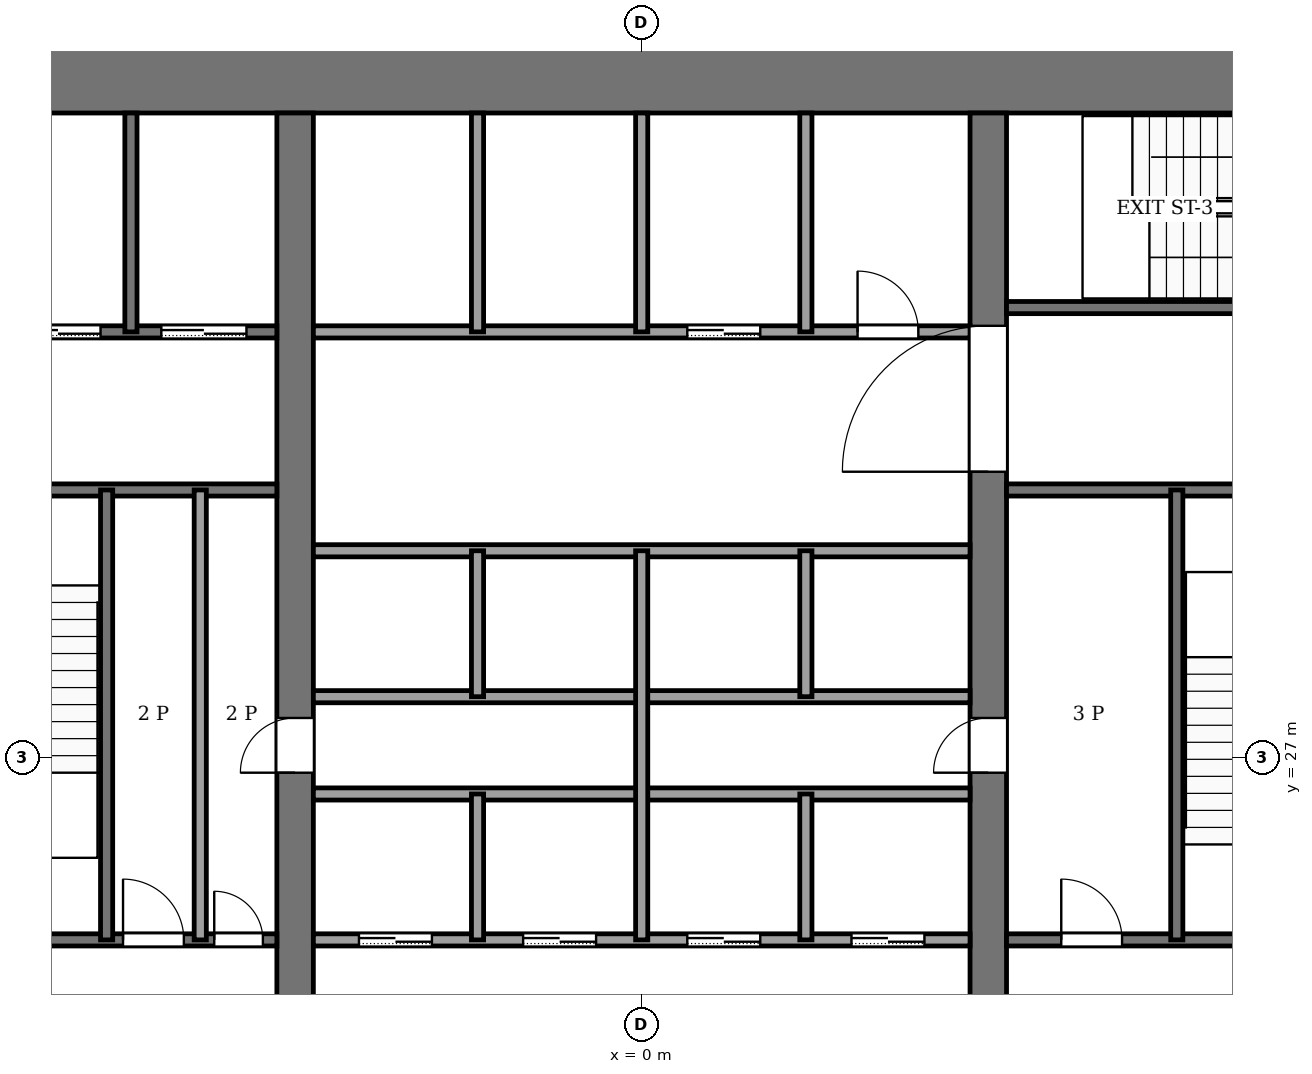
"""IFC4 building model, lengths in metres.
Left out: names, types, materials, properties, quantities, classifications, styles, units other than length and angle.
Written with IfcOpenShell. Run it as: python <this file> out.ifc"""

import sys

from ifc_helpers import new_model, si_unit, direction, frame, frame_2d, origin, place, context, subcontext, project, spatial, rectangle, extrude, element, fill, save


model = new_model("IFC4")
c1 = context("Model", 3, precision=1e-05, world=origin(), true_north=direction((0.0, 1.0)))
c2 = subcontext(c1, "Body", "Model", "MODEL_VIEW")
j1 = project(units=[si_unit("LENGTHUNIT", "METRE"), si_unit("PLANEANGLEUNIT", "RADIAN")], contexts=[c1])
p1 = place(None, origin())
s1 = spatial("IfcSite", under=j1, at=p1, CompositionType="ELEMENT")
p2 = place(p1, origin())
s2 = spatial("IfcBuilding", under=s1, at=p2, CompositionType="ELEMENT")
p3 = place(p2, frame((0.0, 0.0, 34.0)))
s3 = spatial("IfcBuildingStorey", under=s2, at=p3, CompositionType="ELEMENT", Elevation=34.0)
p4 = place(p3, frame((-14.0, 38.3, -0.13), z_axis=(0.0, 0.0, 1.0), x_axis=(1.0, 0.0, 0.0)))
e1 = element("IfcWall", 1, at=p4, inside=s3, PredefinedType="SHEAR", context=c2, shape_type="SweptSolid", body=[
    extrude(rectangle(XDim=28.0, YDim=1.4, at=frame_2d((14.0, 0.0))), origin(), (0.0, 0.0, 1.0), 4.0),
])
p5 = place(p3, frame((-5.7, 18.4, -0.13), z_axis=(0.0, 0.0, 1.0), x_axis=(0.0, 1.0, 0.0)))
e2 = element("IfcWall", 2, at=p5, inside=s3, PredefinedType="SHEAR", context=c2, shape_type="SweptSolid", body=[
    extrude(rectangle(XDim=19.2, YDim=0.6, at=frame_2d((9.6, 0.0))), origin(), (0.0, 0.0, 1.0), 4.0),
])
p6 = place(p5, frame((8.35, 0.0, 0.13)))
e3 = element("IfcOpeningElement", 3, at=p6, cuts=e2, PredefinedType="OPENING", context=c2, shape_type="SweptSolid", body=[
    extrude(rectangle(XDim=0.9, YDim=2.1, at=frame_2d((0.45, 1.05))), frame((0.0, 0.31, 0.0), z_axis=(0.0, -1.0, 0.0), x_axis=(1.0, 0.0, 0.0)), (0.0, 0.0, 1.0), 0.62),
])
p7 = place(p3, frame((5.7, 18.4, -0.13), z_axis=(0.0, 0.0, 1.0), x_axis=(0.0, 1.0, 0.0)))
e4 = element("IfcWall", 4, at=p7, inside=s3, PredefinedType="SHEAR", context=c2, shape_type="SweptSolid", body=[
    extrude(rectangle(XDim=19.2, YDim=0.6, at=frame_2d((9.6, 0.0))), origin(), (0.0, 0.0, 1.0), 4.0),
])
p8 = place(p7, frame((8.35, 0.0, 0.13)))
e5 = element("IfcOpeningElement", 5, at=p8, cuts=e4, PredefinedType="OPENING", context=c2, shape_type="SweptSolid", body=[
    extrude(rectangle(XDim=0.9, YDim=2.1, at=frame_2d((0.45, 1.05))), frame((0.0, 0.31, 0.0), z_axis=(0.0, -1.0, 0.0), x_axis=(1.0, 0.0, 0.0)), (0.0, 0.0, 1.0), 0.62),
])
p9 = place(p7, frame((13.3, 0.0, 0.13)))
e6 = element("IfcOpeningElement", 6, at=p9, cuts=e4, PredefinedType="OPENING", context=c2, shape_type="SweptSolid", body=[
    extrude(rectangle(XDim=2.4, YDim=2.4, at=frame_2d((1.2, 1.2))), frame((0.0, 0.31, 0.0), z_axis=(0.0, -1.0, 0.0), x_axis=(1.0, 0.0, 0.0)), (0.0, 0.0, 1.0), 0.62),
])
p10 = place(p3, frame((-12.6, 24.0, 0.0), z_axis=(0.0, 0.0, 1.0), x_axis=(1.0, 0.0, 0.0)))
e7 = element("IfcWall", 7, at=p10, inside=s3, PredefinedType="PARTITIONING", context=c2, shape_type="SweptSolid", body=[
    extrude(rectangle(XDim=6.6, YDim=0.2, at=frame_2d((3.3, 0.0))), origin(), (0.0, 0.0, 1.0), 3.87),
])
p11 = place(p10, frame((4.07, 0.0, 0.0)))
e8 = element("IfcOpeningElement", 8, at=p11, cuts=e7, PredefinedType="OPENING", context=c2, shape_type="SweptSolid", body=[
    extrude(rectangle(XDim=1.0, YDim=2.1, at=frame_2d((0.5, 1.05))), frame((0.0, 0.11, 0.0), z_axis=(0.0, -1.0, 0.0), x_axis=(1.0, 0.0, 0.0)), (0.0, 0.0, 1.0), 0.22),
])
p12 = place(p10, frame((5.57, 0.0, 0.0)))
e9 = element("IfcOpeningElement", 9, at=p12, cuts=e7, PredefinedType="OPENING", context=c2, shape_type="SweptSolid", body=[
    extrude(rectangle(XDim=0.8, YDim=2.1, at=frame_2d((0.4, 1.05))), frame((0.0, 0.11, 0.0), z_axis=(0.0, -1.0, 0.0), x_axis=(1.0, 0.0, 0.0)), (0.0, 0.0, 1.0), 0.22),
])
p13 = place(p3, frame((-5.4, 24.0, 0.0), z_axis=(0.0, 0.0, 1.0), x_axis=(1.0, 0.0, 0.0)))
e10 = element("IfcWall", 10, at=p13, inside=s3, PredefinedType="PARTITIONING", context=c2, shape_type="SweptSolid", body=[
    extrude(rectangle(XDim=10.8, YDim=0.2, at=frame_2d((5.4, 0.0))), origin(), (0.0, 0.0, 1.0), 3.87),
])
p14 = place(p13, frame((0.75, 0.0, 0.0)))
e11 = element("IfcOpeningElement", 11, at=p14, cuts=e10, PredefinedType="OPENING", context=c2, shape_type="SweptSolid", body=[
    extrude(rectangle(XDim=1.2, YDim=2.2, at=frame_2d((0.6, 1.1))), frame((0.0, 0.11, 0.0), z_axis=(0.0, -1.0, 0.0), x_axis=(1.0, 0.0, 0.0)), (0.0, 0.0, 1.0), 0.22),
])
p15 = place(p13, frame((3.45, 0.0, 0.0)))
e12 = element("IfcOpeningElement", 12, at=p15, cuts=e10, PredefinedType="OPENING", context=c2, shape_type="SweptSolid", body=[
    extrude(rectangle(XDim=1.2, YDim=2.2, at=frame_2d((0.6, 1.1))), frame((0.0, 0.11, 0.0), z_axis=(0.0, -1.0, 0.0), x_axis=(1.0, 0.0, 0.0)), (0.0, 0.0, 1.0), 0.22),
])
p16 = place(p13, frame((6.15, 0.0, 0.0)))
e13 = element("IfcOpeningElement", 13, at=p16, cuts=e10, PredefinedType="OPENING", context=c2, shape_type="SweptSolid", body=[
    extrude(rectangle(XDim=1.2, YDim=2.2, at=frame_2d((0.6, 1.1))), frame((0.0, 0.11, 0.0), z_axis=(0.0, -1.0, 0.0), x_axis=(1.0, 0.0, 0.0)), (0.0, 0.0, 1.0), 0.22),
])
p17 = place(p13, frame((8.85, 0.0, 0.0)))
e14 = element("IfcOpeningElement", 14, at=p17, cuts=e10, PredefinedType="OPENING", context=c2, shape_type="SweptSolid", body=[
    extrude(rectangle(XDim=1.2, YDim=2.2, at=frame_2d((0.6, 1.1))), frame((0.0, 0.11, 0.0), z_axis=(0.0, -1.0, 0.0), x_axis=(1.0, 0.0, 0.0)), (0.0, 0.0, 1.0), 0.22),
])
p18 = place(p3, frame((6.0, 24.0, 0.0), z_axis=(0.0, 0.0, 1.0), x_axis=(1.0, 0.0, 0.0)))
e15 = element("IfcWall", 15, at=p18, inside=s3, PredefinedType="PARTITIONING", context=c2, shape_type="SweptSolid", body=[
    extrude(rectangle(XDim=6.6, YDim=0.2, at=frame_2d((3.3, 0.0))), origin(), (0.0, 0.0, 1.0), 3.87),
])
p19 = place(p18, frame((0.9, 0.0, 0.0)))
e16 = element("IfcOpeningElement", 16, at=p19, cuts=e15, PredefinedType="OPENING", context=c2, shape_type="SweptSolid", body=[
    extrude(rectangle(XDim=1.0, YDim=2.1, at=frame_2d((0.5, 1.05))), frame((0.0, 0.11, 0.0), z_axis=(0.0, -1.0, 0.0), x_axis=(1.0, 0.0, 0.0)), (0.0, 0.0, 1.0), 0.22),
])
p20 = place(p18, frame((4.4, 0.0, 0.0)))
e17 = element("IfcOpeningElement", 17, at=p20, cuts=e15, PredefinedType="OPENING", context=c2, shape_type="SweptSolid", body=[
    extrude(rectangle(XDim=1.2, YDim=2.2, at=frame_2d((0.6, 1.1))), frame((0.0, 0.11, 0.0), z_axis=(0.0, -1.0, 0.0), x_axis=(1.0, 0.0, 0.0)), (0.0, 0.0, 1.0), 0.22),
])
for number, where, z_axis, x_axis in (
    (18, (-5.4, 26.4, 0.0), (0.0, 0.0, 1.0), (1.0, 0.0, 0.0)),
    (19, (-5.4, 28.0, 0.0), (0.0, 0.0, 1.0), (1.0, 0.0, 0.0)),
    (20, (-5.4, 30.4, 0.0), (0.0, 0.0, 1.0), (1.0, 0.0, 0.0)),
):
    element("IfcWall", number, at=place(p3, frame(where, z_axis=z_axis, x_axis=x_axis)), inside=s3, PredefinedType="PARTITIONING", context=c2, shape_type="SweptSolid", body=[
        extrude(rectangle(XDim=10.8, YDim=0.2, at=frame_2d((5.4, 0.0))), origin(), (0.0, 0.0, 1.0), 3.87),
    ])
p21 = place(p3, frame((-12.6, 31.4, 0.0), z_axis=(0.0, 0.0, 1.0), x_axis=(1.0, 0.0, 0.0)))
e21 = element("IfcWall", 21, at=p21, inside=s3, PredefinedType="PARTITIONING", context=c2, shape_type="SweptSolid", body=[
    extrude(rectangle(XDim=6.6, YDim=0.2, at=frame_2d((3.3, 0.0))), origin(), (0.0, 0.0, 1.0), 3.87),
])
p22 = place(p21, frame((1.0, 0.0, 0.0)))
e22 = element("IfcOpeningElement", 22, at=p22, cuts=e21, PredefinedType="OPENING", context=c2, shape_type="SweptSolid", body=[
    extrude(rectangle(XDim=1.2, YDim=2.2, at=frame_2d((0.6, 1.1))), frame((0.0, 0.11, 0.0), z_axis=(0.0, -1.0, 0.0), x_axis=(1.0, 0.0, 0.0)), (0.0, 0.0, 1.0), 0.22),
])
p23 = place(p3, frame((6.0, 31.4, 0.0), z_axis=(0.0, 0.0, 1.0), x_axis=(1.0, 0.0, 0.0)))
e23 = element("IfcWall", 23, at=p23, inside=s3, PredefinedType="PARTITIONING", context=c2, shape_type="SweptSolid", body=[
    extrude(rectangle(XDim=6.6, YDim=0.2, at=frame_2d((3.3, 0.0))), origin(), (0.0, 0.0, 1.0), 3.87),
])
p24 = place(p3, frame((-12.6, 34.0, 0.0), z_axis=(0.0, 0.0, 1.0), x_axis=(1.0, 0.0, 0.0)))
e24 = element("IfcWall", 24, at=p24, inside=s3, PredefinedType="PARTITIONING", context=c2, shape_type="SweptSolid", body=[
    extrude(rectangle(XDim=6.6, YDim=0.2, at=frame_2d((3.3, 0.0))), origin(), (0.0, 0.0, 1.0), 3.87),
])
p25 = place(p24, frame((4.7, 0.0, 0.0)))
e25 = element("IfcOpeningElement", 25, at=p25, cuts=e24, PredefinedType="OPENING", context=c2, shape_type="SweptSolid", body=[
    extrude(rectangle(XDim=1.4, YDim=2.2, at=frame_2d((0.7, 1.1))), frame((0.0, 0.11, 0.0), z_axis=(0.0, -1.0, 0.0), x_axis=(1.0, 0.0, 0.0)), (0.0, 0.0, 1.0), 0.22),
])
p26 = place(p24, frame((2.3, 0.0, 0.0)))
e26 = element("IfcOpeningElement", 26, at=p26, cuts=e24, PredefinedType="OPENING", context=c2, shape_type="SweptSolid", body=[
    extrude(rectangle(XDim=1.4, YDim=2.2, at=frame_2d((0.7, 1.1))), frame((0.0, 0.11, 0.0), z_axis=(0.0, -1.0, 0.0), x_axis=(1.0, 0.0, 0.0)), (0.0, 0.0, 1.0), 0.22),
])
p27 = place(p24, frame((0.45, 0.0, 0.0)))
e27 = element("IfcOpeningElement", 27, at=p27, cuts=e24, PredefinedType="OPENING", context=c2, shape_type="SweptSolid", body=[
    extrude(rectangle(XDim=0.9, YDim=2.1, at=frame_2d((0.45, 1.05))), frame((0.0, 0.11, 0.0), z_axis=(0.0, -1.0, 0.0), x_axis=(1.0, 0.0, 0.0)), (0.0, 0.0, 1.0), 0.22),
])
p28 = place(p3, frame((-5.4, 34.0, 0.0), z_axis=(0.0, 0.0, 1.0), x_axis=(1.0, 0.0, 0.0)))
e28 = element("IfcWall", 28, at=p28, inside=s3, PredefinedType="PARTITIONING", context=c2, shape_type="SweptSolid", body=[
    extrude(rectangle(XDim=10.8, YDim=0.2, at=frame_2d((5.4, 0.0))), origin(), (0.0, 0.0, 1.0), 3.87),
])
p29 = place(p28, frame((6.15, 0.0, 0.0)))
e29 = element("IfcOpeningElement", 29, at=p29, cuts=e28, PredefinedType="OPENING", context=c2, shape_type="SweptSolid", body=[
    extrude(rectangle(XDim=1.2, YDim=2.2, at=frame_2d((0.6, 1.1))), frame((0.0, 0.11, 0.0), z_axis=(0.0, -1.0, 0.0), x_axis=(1.0, 0.0, 0.0)), (0.0, 0.0, 1.0), 0.22),
])
p30 = place(p28, frame((8.95, 0.0, 0.0)))
e30 = element("IfcOpeningElement", 30, at=p30, cuts=e28, PredefinedType="OPENING", context=c2, shape_type="SweptSolid", body=[
    extrude(rectangle(XDim=1.0, YDim=2.1, at=frame_2d((0.5, 1.05))), frame((0.0, 0.11, 0.0), z_axis=(0.0, -1.0, 0.0), x_axis=(1.0, 0.0, 0.0)), (0.0, 0.0, 1.0), 0.22),
])
p31 = place(p3, frame((6.0, 34.4, 0.0), z_axis=(0.0, 0.0, 1.0), x_axis=(1.0, 0.0, 0.0)))
e31 = element("IfcWall", 31, at=p31, inside=s3, PredefinedType="PARTITIONING", context=c2, shape_type="SweptSolid", body=[
    extrude(rectangle(XDim=6.6, YDim=0.2, at=frame_2d((3.3, 0.0))), origin(), (0.0, 0.0, 1.0), 3.87),
])
p32 = place(p31, frame((4.8, 0.0, 0.0)))
e32 = element("IfcOpeningElement", 32, at=p32, cuts=e31, PredefinedType="OPENING", context=c2, shape_type="SweptSolid", body=[
    extrude(rectangle(XDim=1.2, YDim=2.2, at=frame_2d((0.6, 1.1))), frame((0.0, 0.11, 0.0), z_axis=(0.0, -1.0, 0.0), x_axis=(1.0, 0.0, 0.0)), (0.0, 0.0, 1.0), 0.22),
])
p33 = place(p3, frame((-8.8, 24.0, 0.0), z_axis=(0.0, 0.0, 1.0), x_axis=(0.0, 1.0, 0.0)))
e33 = element("IfcWall", 33, at=p33, inside=s3, PredefinedType="PARTITIONING", context=c2, shape_type="SweptSolid", body=[
    extrude(rectangle(XDim=7.4, YDim=0.2, at=frame_2d((3.7, 0.0))), origin(), (0.0, 0.0, 1.0), 3.87),
])
p34 = place(p3, frame((-8.4, 34.0, 0.0), z_axis=(0.0, 0.0, 1.0), x_axis=(0.0, 1.0, 0.0)))
e34 = element("IfcWall", 34, at=p34, inside=s3, PredefinedType="PARTITIONING", context=c2, shape_type="SweptSolid", body=[
    extrude(rectangle(XDim=3.6, YDim=0.2, at=frame_2d((1.8, 0.0))), origin(), (0.0, 0.0, 1.0), 3.87),
])
p35 = place(p3, frame((-7.26, 24.0, 0.0), z_axis=(0.0, 0.0, 1.0), x_axis=(0.0, 1.0, 0.0)))
e35 = element("IfcWall", 35, at=p35, inside=s3, PredefinedType="PARTITIONING", context=c2, shape_type="SweptSolid", body=[
    extrude(rectangle(XDim=7.4, YDim=0.2, at=frame_2d((3.7, 0.0))), origin(), (0.0, 0.0, 1.0), 3.87),
])
for number, where, z_axis, x_axis in (
    (36, (-2.7, 24.0, 0.0), (0.0, 0.0, 1.0), (0.0, 1.0, 0.0)),
    (37, (-2.7, 28.0, 0.0), (0.0, 0.0, 1.0), (0.0, 1.0, 0.0)),
):
    element("IfcWall", number, at=place(p3, frame(where, z_axis=z_axis, x_axis=x_axis)), inside=s3, PredefinedType="PARTITIONING", context=c2, shape_type="SweptSolid", body=[
        extrude(rectangle(XDim=2.4, YDim=0.2, at=frame_2d((1.2, 0.0))), origin(), (0.0, 0.0, 1.0), 3.87),
    ])
p36 = place(p3, frame((-2.7, 34.0, 0.0), z_axis=(0.0, 0.0, 1.0), x_axis=(0.0, 1.0, 0.0)))
e38 = element("IfcWall", 38, at=p36, inside=s3, PredefinedType="PARTITIONING", context=c2, shape_type="SweptSolid", body=[
    extrude(rectangle(XDim=3.6, YDim=0.2, at=frame_2d((1.8, 0.0))), origin(), (0.0, 0.0, 1.0), 3.87),
])
p37 = place(p3, frame((0.0, 24.0, 0.0), z_axis=(0.0, 0.0, 1.0), x_axis=(0.0, 1.0, 0.0)))
e39 = element("IfcWall", 39, at=p37, inside=s3, PredefinedType="PARTITIONING", context=c2, shape_type="SweptSolid", body=[
    extrude(rectangle(XDim=6.4, YDim=0.2, at=frame_2d((3.2, 0.0))), origin(), (0.0, 0.0, 1.0), 3.87),
])
p38 = place(p3, frame((0.0, 34.0, 0.0), z_axis=(0.0, 0.0, 1.0), x_axis=(0.0, 1.0, 0.0)))
e40 = element("IfcWall", 40, at=p38, inside=s3, PredefinedType="PARTITIONING", context=c2, shape_type="SweptSolid", body=[
    extrude(rectangle(XDim=3.6, YDim=0.2, at=frame_2d((1.8, 0.0))), origin(), (0.0, 0.0, 1.0), 3.87),
])
for number, where, z_axis, x_axis in (
    (41, (2.7, 24.0, 0.0), (0.0, 0.0, 1.0), (0.0, 1.0, 0.0)),
    (42, (2.7, 28.0, 0.0), (0.0, 0.0, 1.0), (0.0, 1.0, 0.0)),
):
    element("IfcWall", number, at=place(p3, frame(where, z_axis=z_axis, x_axis=x_axis)), inside=s3, PredefinedType="PARTITIONING", context=c2, shape_type="SweptSolid", body=[
        extrude(rectangle(XDim=2.4, YDim=0.2, at=frame_2d((1.2, 0.0))), origin(), (0.0, 0.0, 1.0), 3.87),
    ])
p39 = place(p3, frame((2.7, 34.0, 0.0), z_axis=(0.0, 0.0, 1.0), x_axis=(0.0, 1.0, 0.0)))
e43 = element("IfcWall", 43, at=p39, inside=s3, PredefinedType="PARTITIONING", context=c2, shape_type="SweptSolid", body=[
    extrude(rectangle(XDim=3.6, YDim=0.2, at=frame_2d((1.8, 0.0))), origin(), (0.0, 0.0, 1.0), 3.87),
])
p40 = place(p3, frame((8.8, 24.0, 0.0), z_axis=(0.0, 0.0, 1.0), x_axis=(0.0, 1.0, 0.0)))
e44 = element("IfcWall", 44, at=p40, inside=s3, PredefinedType="PARTITIONING", context=c2, shape_type="SweptSolid", body=[
    extrude(rectangle(XDim=7.4, YDim=0.2, at=frame_2d((3.7, 0.0))), origin(), (0.0, 0.0, 1.0), 3.87),
])
p41 = place(p14, origin())
e45 = element("IfcDoor", 45, at=p41, inside=s3, OperationType="SLIDING_TO_LEFT", PredefinedType="DOOR", context=c2, shape_type="SweptSolid", body=[
    extrude(rectangle(XDim=1.2, YDim=2.2, at=frame_2d((0.6, 1.1))), frame((0.0, 0.025, 0.0), z_axis=(0.0, -1.0, 0.0), x_axis=(1.0, 0.0, 0.0)), (0.0, 0.0, 1.0), 0.05),
])
fill(e11, e45)
p42 = place(p15, origin())
e46 = element("IfcDoor", 46, at=p42, inside=s3, OperationType="SLIDING_TO_LEFT", PredefinedType="DOOR", context=c2, shape_type="SweptSolid", body=[
    extrude(rectangle(XDim=1.2, YDim=2.2, at=frame_2d((0.6, 1.1))), frame((0.0, 0.025, 0.0), z_axis=(0.0, -1.0, 0.0), x_axis=(1.0, 0.0, 0.0)), (0.0, 0.0, 1.0), 0.05),
])
fill(e12, e46)
p43 = place(p16, origin())
e47 = element("IfcDoor", 47, at=p43, inside=s3, OperationType="SLIDING_TO_LEFT", PredefinedType="DOOR", context=c2, shape_type="SweptSolid", body=[
    extrude(rectangle(XDim=1.2, YDim=2.2, at=frame_2d((0.6, 1.1))), frame((0.0, 0.025, 0.0), z_axis=(0.0, -1.0, 0.0), x_axis=(1.0, 0.0, 0.0)), (0.0, 0.0, 1.0), 0.05),
])
fill(e13, e47)
p44 = place(p17, origin())
e48 = element("IfcDoor", 48, at=p44, inside=s3, OperationType="SLIDING_TO_LEFT", PredefinedType="DOOR", context=c2, shape_type="SweptSolid", body=[
    extrude(rectangle(XDim=1.2, YDim=2.2, at=frame_2d((0.6, 1.1))), frame((0.0, 0.025, 0.0), z_axis=(0.0, -1.0, 0.0), x_axis=(1.0, 0.0, 0.0)), (0.0, 0.0, 1.0), 0.05),
])
fill(e14, e48)
p45 = place(p29, origin())
e49 = element("IfcDoor", 49, at=p45, inside=s3, OperationType="SLIDING_TO_LEFT", PredefinedType="DOOR", context=c2, shape_type="SweptSolid", body=[
    extrude(rectangle(XDim=1.2, YDim=2.2, at=frame_2d((0.6, 1.1))), frame((0.0, 0.025, 0.0), z_axis=(0.0, -1.0, 0.0), x_axis=(1.0, 0.0, 0.0)), (0.0, 0.0, 1.0), 0.05),
])
fill(e29, e49)
p46 = place(p25, origin())
e50 = element("IfcDoor", 50, at=p46, inside=s3, OperationType="SLIDING_TO_LEFT", PredefinedType="DOOR", context=c2, shape_type="SweptSolid", body=[
    extrude(rectangle(XDim=1.4, YDim=2.2, at=frame_2d((0.7, 1.1))), frame((0.0, 0.025, 0.0), z_axis=(0.0, -1.0, 0.0), x_axis=(1.0, 0.0, 0.0)), (0.0, 0.0, 1.0), 0.05),
])
fill(e25, e50)
p47 = place(p26, origin())
e51 = element("IfcDoor", 51, at=p47, inside=s3, OperationType="SLIDING_TO_LEFT", PredefinedType="DOOR", context=c2, shape_type="SweptSolid", body=[
    extrude(rectangle(XDim=1.4, YDim=2.2, at=frame_2d((0.7, 1.1))), frame((0.0, 0.025, 0.0), z_axis=(0.0, -1.0, 0.0), x_axis=(1.0, 0.0, 0.0)), (0.0, 0.0, 1.0), 0.05),
])
fill(e26, e51)
p48 = place(p11, origin())
e52 = element("IfcDoor", 52, at=p48, inside=s3, OperationType="SINGLE_SWING_RIGHT", PredefinedType="DOOR", context=c2, shape_type="SweptSolid", body=[
    extrude(rectangle(XDim=1.0, YDim=2.1, at=frame_2d((0.5, 1.05))), frame((0.0, 0.025, 0.0), z_axis=(0.0, -1.0, 0.0), x_axis=(1.0, 0.0, 0.0)), (0.0, 0.0, 1.0), 0.05),
])
fill(e8, e52)
p49 = place(p12, origin())
e53 = element("IfcDoor", 53, at=p49, inside=s3, OperationType="SINGLE_SWING_LEFT", PredefinedType="DOOR", context=c2, shape_type="SweptSolid", body=[
    extrude(rectangle(XDim=0.8, YDim=2.1, at=frame_2d((0.4, 1.05))), frame((0.0, 0.025, 0.0), z_axis=(0.0, -1.0, 0.0), x_axis=(1.0, 0.0, 0.0)), (0.0, 0.0, 1.0), 0.05),
])
fill(e9, e53)
p50 = place(p19, origin())
e54 = element("IfcDoor", 54, at=p50, inside=s3, OperationType="SINGLE_SWING_RIGHT", PredefinedType="DOOR", context=c2, shape_type="SweptSolid", body=[
    extrude(rectangle(XDim=1.0, YDim=2.1, at=frame_2d((0.5, 1.05))), frame((0.0, 0.025, 0.0), z_axis=(0.0, -1.0, 0.0), x_axis=(1.0, 0.0, 0.0)), (0.0, 0.0, 1.0), 0.05),
])
fill(e16, e54)
p51 = place(p30, origin())
e55 = element("IfcDoor", 55, at=p51, inside=s3, OperationType="SINGLE_SWING_LEFT", PredefinedType="DOOR", context=c2, shape_type="SweptSolid", body=[
    extrude(rectangle(XDim=1.0, YDim=2.1, at=frame_2d((0.5, 1.05))), frame((0.0, 0.025, 0.0), z_axis=(0.0, -1.0, 0.0), x_axis=(1.0, 0.0, 0.0)), (0.0, 0.0, 1.0), 0.05),
])
fill(e30, e55)
p52 = place(p6, origin())
e56 = element("IfcDoor", 56, at=p52, inside=s3, OperationType="SINGLE_SWING_LEFT", PredefinedType="DOOR", context=c2, shape_type="SweptSolid", body=[
    extrude(rectangle(XDim=0.9, YDim=2.1, at=frame_2d((0.45, 1.05))), frame((0.0, 0.025, 0.0), z_axis=(0.0, -1.0, 0.0), x_axis=(1.0, 0.0, 0.0)), (0.0, 0.0, 1.0), 0.05),
])
fill(e3, e56)
p53 = place(p8, origin())
e57 = element("IfcDoor", 57, at=p53, inside=s3, OperationType="SINGLE_SWING_RIGHT", PredefinedType="DOOR", context=c2, shape_type="SweptSolid", body=[
    extrude(rectangle(XDim=0.9, YDim=2.1, at=frame_2d((0.45, 1.05))), frame((0.0, 0.025, 0.0), z_axis=(0.0, -1.0, 0.0), x_axis=(1.0, 0.0, 0.0)), (0.0, 0.0, 1.0), 0.05),
])
fill(e5, e57)
p54 = place(p9, origin())
e58 = element("IfcDoor", 58, at=p54, inside=s3, OperationType="DOUBLE_DOOR_SINGLE_SWING", PredefinedType="DOOR", context=c2, shape_type="SweptSolid", body=[
    extrude(rectangle(XDim=2.4, YDim=2.4, at=frame_2d((1.2, 1.2))), frame((0.0, 0.025, 0.0), z_axis=(0.0, -1.0, 0.0), x_axis=(1.0, 0.0, 0.0)), (0.0, 0.0, 1.0), 0.05),
])
fill(e6, e58)
save(model, sys.argv[1])
